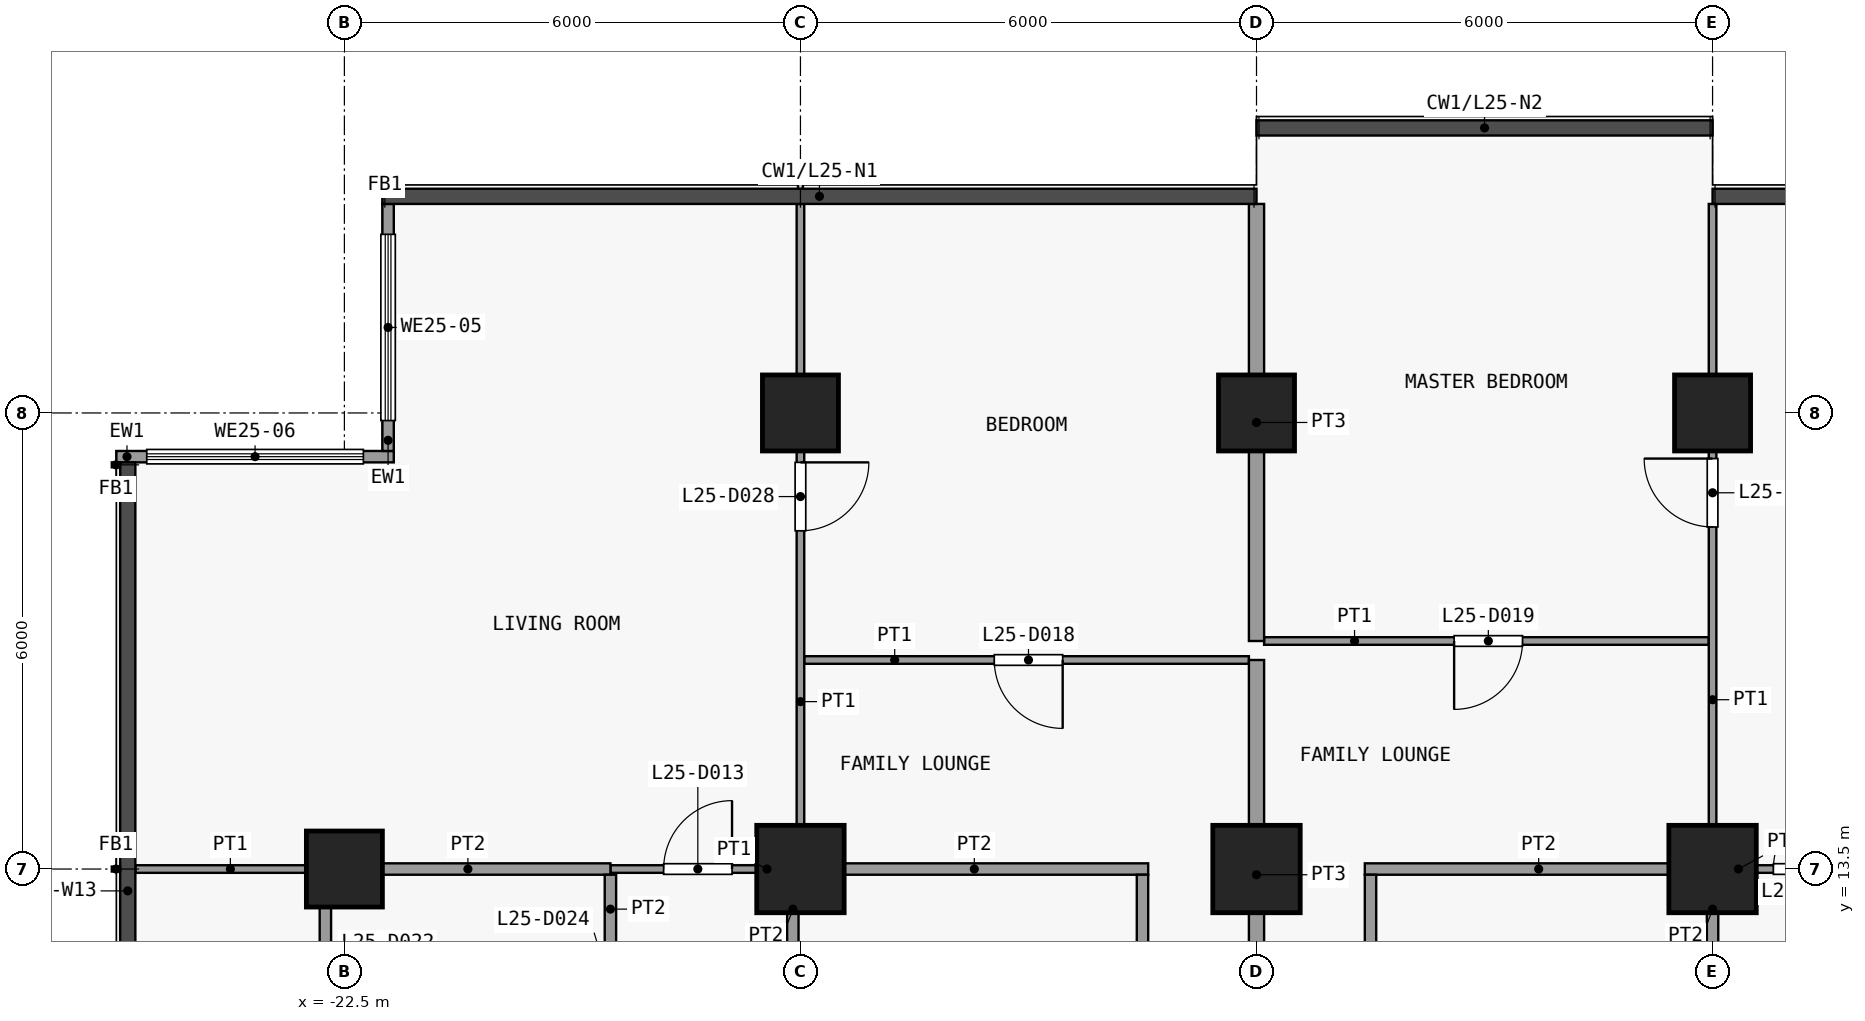
"""IFC4 building model, lengths in metres.
Left out: names, types, materials, properties, quantities, classifications, styles, units other than length and angle.
Written with IfcOpenShell. Run it as: python <this file> out.ifc"""

import sys

from ifc_helpers import new_model, si_unit, direction, frame, frame_2d, origin, origin_2d, place, context, subcontext, project, spatial, rectangle, extrude, element, fill, save


model = new_model("IFC4")
c1 = context("Model", 3, precision=1e-05, world=origin(), true_north=direction((0.0, 1.0)))
c2 = subcontext(c1, "Body", "Model", "MODEL_VIEW")
j1 = project(units=[si_unit("LENGTHUNIT", "METRE"), si_unit("PLANEANGLEUNIT", "RADIAN")], contexts=[c1])
p1 = place(None, origin())
s1 = spatial("IfcSite", under=j1, at=p1, CompositionType="ELEMENT")
p2 = place(p1, origin())
s2 = spatial("IfcBuilding", under=s1, at=p2, CompositionType="ELEMENT")
p3 = place(p2, frame((0.0, 0.0, 102.7)))
s3 = spatial("IfcBuildingStorey", under=s2, at=p3, CompositionType="ELEMENT", Elevation=102.7)
p4 = place(p3, frame((-22.5, 13.5, 0.0), z_axis=(0.0, 0.0, 1.0), x_axis=(1.0, 0.0, 0.0)))
e1 = element("IfcColumn", 1, at=p4, inside=s3, PredefinedType="COLUMN", context=c2, shape_type="SweptSolid", body=[
    extrude(rectangle(XDim=1.0, YDim=1.0, at=origin_2d()), origin(), (0.0, 0.0, 1.0), 3.6),
])
p5 = place(p3, frame((-16.5, 13.5, 0.0), z_axis=(0.0, 0.0, 1.0), x_axis=(1.0, 0.0, 0.0)))
e2 = element("IfcColumn", 2, at=p5, inside=s3, PredefinedType="COLUMN", context=c2, shape_type="SweptSolid", body=[
    extrude(rectangle(XDim=1.15, YDim=1.15, at=origin_2d()), origin(), (0.0, 0.0, 1.0), 3.6),
])
p6 = place(p3, frame((-16.5, 19.5, 0.0), z_axis=(0.0, 0.0, 1.0), x_axis=(1.0, 0.0, 0.0)))
e3 = element("IfcColumn", 3, at=p6, inside=s3, PredefinedType="COLUMN", context=c2, shape_type="SweptSolid", body=[
    extrude(rectangle(XDim=1.0, YDim=1.0, at=origin_2d()), origin(), (0.0, 0.0, 1.0), 3.6),
])
p7 = place(p3, frame((-10.5, 13.5, 0.0), z_axis=(0.0, 0.0, 1.0), x_axis=(1.0, 0.0, 0.0)))
e4 = element("IfcColumn", 4, at=p7, inside=s3, PredefinedType="COLUMN", context=c2, shape_type="SweptSolid", body=[
    extrude(rectangle(XDim=1.15, YDim=1.15, at=origin_2d()), origin(), (0.0, 0.0, 1.0), 3.6),
])
p8 = place(p3, frame((-10.5, 19.5, 0.0), z_axis=(0.0, 0.0, 1.0), x_axis=(1.0, 0.0, 0.0)))
e5 = element("IfcColumn", 5, at=p8, inside=s3, PredefinedType="COLUMN", context=c2, shape_type="SweptSolid", body=[
    extrude(rectangle(XDim=1.0, YDim=1.0, at=origin_2d()), origin(), (0.0, 0.0, 1.0), 3.6),
])
p9 = place(p3, frame((-4.5, 13.5, 0.0), z_axis=(0.0, 0.0, 1.0), x_axis=(1.0, 0.0, 0.0)))
e6 = element("IfcColumn", 6, at=p9, inside=s3, PredefinedType="COLUMN", context=c2, shape_type="SweptSolid", body=[
    extrude(rectangle(XDim=1.15, YDim=1.15, at=origin_2d()), origin(), (0.0, 0.0, 1.0), 3.6),
])
p10 = place(p3, frame((-4.5, 19.5, 0.0), z_axis=(0.0, 0.0, 1.0), x_axis=(1.0, 0.0, 0.0)))
e7 = element("IfcColumn", 7, at=p10, inside=s3, PredefinedType="COLUMN", context=c2, shape_type="SweptSolid", body=[
    extrude(rectangle(XDim=1.0, YDim=1.0, at=origin_2d()), origin(), (0.0, 0.0, 1.0), 3.6),
])
p11 = place(p3, frame((-21.925, 19.0, 0.0), z_axis=(0.0, 0.0, 1.0), x_axis=(0.0, 1.0, 0.0)))
e8 = element("IfcWall", 8, at=p11, inside=s3, PredefinedType="SOLIDWALL", context=c2, shape_type="SweptSolid", body=[
    extrude(rectangle(XDim=3.25, YDim=0.15, at=frame_2d((1.625, 0.0))), origin(), (0.0, 0.0, 1.0), 3.3),
])
p12 = place(p11, frame((0.4, 0.0, 0.9)))
e9 = element("IfcOpeningElement", 9, at=p12, cuts=e8, PredefinedType="OPENING", context=c2, shape_type="SweptSolid", body=[
    extrude(rectangle(XDim=2.45, YDim=2.4, at=frame_2d((1.225, 1.2))), frame((0.0, 0.085, 0.0), z_axis=(0.0, -1.0, 0.0), x_axis=(1.0, 0.0, 0.0)), (0.0, 0.0, 1.0), 0.17),
])
p13 = place(p3, frame((-25.5, 18.925, 0.0), z_axis=(0.0, 0.0, 1.0), x_axis=(1.0, 0.0, 0.0)))
e10 = element("IfcWall", 10, at=p13, inside=s3, PredefinedType="SOLIDWALL", context=c2, shape_type="SweptSolid", body=[
    extrude(rectangle(XDim=3.65, YDim=0.15, at=frame_2d((1.825, 0.0))), origin(), (0.0, 0.0, 1.0), 3.3),
])
p14 = place(p13, frame((0.4, 0.0, 0.9)))
e11 = element("IfcOpeningElement", 11, at=p14, cuts=e10, PredefinedType="OPENING", context=c2, shape_type="SweptSolid", body=[
    extrude(rectangle(XDim=2.85, YDim=2.4, at=frame_2d((1.425, 1.2))), frame((0.0, 0.085, 0.0), z_axis=(0.0, -1.0, 0.0), x_axis=(1.0, 0.0, 0.0)), (0.0, 0.0, 1.0), 0.17),
])
p15 = place(p3, frame((-25.25, 13.5, 0.0), z_axis=(0.0, 0.0, 1.0), x_axis=(1.0, 0.0, 0.0)))
e12 = element("IfcWall", 12, at=p15, inside=s3, PredefinedType="PARTITIONING", context=c2, shape_type="SweptSolid", body=[
    extrude(rectangle(XDim=2.5, YDim=0.1, at=frame_2d((1.25, 0.0))), origin(), (0.0, 0.0, 1.0), 3.3),
])
p16 = place(p3, frame((-19.0, 13.5, 0.0), z_axis=(0.0, 0.0, 1.0), x_axis=(1.0, 0.0, 0.0)))
e13 = element("IfcWall", 13, at=p16, inside=s3, PredefinedType="PARTITIONING", context=c2, shape_type="SweptSolid", body=[
    extrude(rectangle(XDim=2.4, YDim=0.1, at=frame_2d((1.2, 0.0))), origin(), (0.0, 0.0, 1.0), 3.3),
])
p17 = place(p16, frame((0.7, 0.0, 0.0)))
e14 = element("IfcOpeningElement", 14, at=p17, cuts=e13, PredefinedType="OPENING", context=c2, shape_type="SweptSolid", body=[
    extrude(rectangle(XDim=0.9, YDim=2.1, at=frame_2d((0.45, 1.05))), frame((0.0, 0.06, 0.0), z_axis=(0.0, -1.0, 0.0), x_axis=(1.0, 0.0, 0.0)), (0.0, 0.0, 1.0), 0.12),
])
p18 = place(p3, frame((-4.5, 13.5, 0.0), z_axis=(0.0, 0.0, 1.0), x_axis=(1.0, 0.0, 0.0)))
e15 = element("IfcWall", 15, at=p18, inside=s3, PredefinedType="PARTITIONING", context=c2, shape_type="SweptSolid", body=[
    extrude(rectangle(XDim=2.4, YDim=0.1, at=frame_2d((1.2, 0.0))), origin(), (0.0, 0.0, 1.0), 3.3),
])
p19 = place(p18, frame((0.8, 0.0, 0.0)))
e16 = element("IfcOpeningElement", 16, at=p19, cuts=e15, PredefinedType="OPENING", context=c2, shape_type="SweptSolid", body=[
    extrude(rectangle(XDim=0.9, YDim=2.1, at=frame_2d((0.45, 1.05))), frame((0.0, 0.06, 0.0), z_axis=(0.0, -1.0, 0.0), x_axis=(1.0, 0.0, 0.0)), (0.0, 0.0, 1.0), 0.12),
])
p20 = place(p3, frame((-22.75, 13.5, 0.0), z_axis=(0.0, 0.0, 1.0), x_axis=(1.0, 0.0, 0.0)))
e17 = element("IfcWall", 17, at=p20, inside=s3, PredefinedType="PARTITIONING", context=c2, shape_type="SweptSolid", body=[
    extrude(rectangle(XDim=3.75, YDim=0.15, at=frame_2d((1.875, 0.0))), origin(), (0.0, 0.0, 1.0), 3.3),
])
for number, where, z_axis, x_axis in (
    (18, (-16.5, 13.5, 0.0), (0.0, 0.0, 1.0), (1.0, 0.0, 0.0)),
    (19, (-9.075, 13.5, 0.0), (0.0, 0.0, 1.0), (1.0, 0.0, 0.0)),
):
    element("IfcWall", number, at=place(p3, frame(where, z_axis=z_axis, x_axis=x_axis)), inside=s3, PredefinedType="PARTITIONING", context=c2, shape_type="SweptSolid", body=[
        extrude(rectangle(XDim=4.575, YDim=0.15, at=frame_2d((2.288, 0.0))), origin(), (0.0, 0.0, 1.0), 3.3),
    ])
p21 = place(p3, frame((-16.45, 16.25, 0.0), z_axis=(0.0, 0.0, 1.0), x_axis=(1.0, 0.0, 0.0)))
e20 = element("IfcWall", 20, at=p21, inside=s3, PredefinedType="PARTITIONING", context=c2, shape_type="SweptSolid", body=[
    extrude(rectangle(XDim=5.85, YDim=0.1, at=frame_2d((2.925, 0.0))), origin(), (0.0, 0.0, 1.0), 3.3),
])
p22 = place(p21, frame((2.5, 0.0, 0.0)))
e21 = element("IfcOpeningElement", 21, at=p22, cuts=e20, PredefinedType="OPENING", context=c2, shape_type="SweptSolid", body=[
    extrude(rectangle(XDim=0.9, YDim=2.1, at=frame_2d((0.45, 1.05))), frame((0.0, 0.06, 0.0), z_axis=(0.0, -1.0, 0.0), x_axis=(1.0, 0.0, 0.0)), (0.0, 0.0, 1.0), 0.12),
])
p23 = place(p3, frame((-10.4, 16.5, 0.0), z_axis=(0.0, 0.0, 1.0), x_axis=(1.0, 0.0, 0.0)))
e22 = element("IfcWall", 22, at=p23, inside=s3, PredefinedType="PARTITIONING", context=c2, shape_type="SweptSolid", body=[
    extrude(rectangle(XDim=5.85, YDim=0.1, at=frame_2d((2.925, 0.0))), origin(), (0.0, 0.0, 1.0), 3.3),
])
p24 = place(p23, frame((2.5, 0.0, 0.0)))
e23 = element("IfcOpeningElement", 23, at=p24, cuts=e22, PredefinedType="OPENING", context=c2, shape_type="SweptSolid", body=[
    extrude(rectangle(XDim=0.9, YDim=2.1, at=frame_2d((0.45, 1.05))), frame((0.0, 0.06, 0.0), z_axis=(0.0, -1.0, 0.0), x_axis=(1.0, 0.0, 0.0)), (0.0, 0.0, 1.0), 0.12),
])
p25 = place(p3, frame((-22.75, 10.6, 0.0), z_axis=(0.0, 0.0, 1.0), x_axis=(0.0, 1.0, 0.0)))
e24 = element("IfcWall", 24, at=p25, inside=s3, PredefinedType="PARTITIONING", context=c2, shape_type="SweptSolid", body=[
    extrude(rectangle(XDim=2.825, YDim=0.15, at=frame_2d((1.413, 0.0))), origin(), (0.0, 0.0, 1.0), 3.3),
])
p26 = place(p25, frame((1.0, 0.0, 0.0)))
e25 = element("IfcOpeningElement", 25, at=p26, cuts=e24, PredefinedType="OPENING", context=c2, shape_type="SweptSolid", body=[
    extrude(rectangle(XDim=0.9, YDim=2.1, at=frame_2d((0.45, 1.05))), frame((0.0, 0.085, 0.0), z_axis=(0.0, -1.0, 0.0), x_axis=(1.0, 0.0, 0.0)), (0.0, 0.0, 1.0), 0.17),
])
p27 = place(p3, frame((-19.0, 10.6, 0.0), z_axis=(0.0, 0.0, 1.0), x_axis=(0.0, 1.0, 0.0)))
e26 = element("IfcWall", 26, at=p27, inside=s3, PredefinedType="PARTITIONING", context=c2, shape_type="SweptSolid", body=[
    extrude(rectangle(XDim=2.825, YDim=0.15, at=frame_2d((1.413, 0.0))), origin(), (0.0, 0.0, 1.0), 3.3),
])
p28 = place(p27, frame((0.9, 0.0, 0.0)))
e27 = element("IfcOpeningElement", 27, at=p28, cuts=e26, PredefinedType="OPENING", context=c2, shape_type="SweptSolid", body=[
    extrude(rectangle(XDim=0.9, YDim=2.1, at=frame_2d((0.45, 1.05))), frame((0.0, 0.085, 0.0), z_axis=(0.0, -1.0, 0.0), x_axis=(1.0, 0.0, 0.0)), (0.0, 0.0, 1.0), 0.17),
])
p29 = place(p3, frame((-16.6, 10.6, 0.0), z_axis=(0.0, 0.0, 1.0), x_axis=(0.0, 1.0, 0.0)))
e28 = element("IfcWall", 28, at=p29, inside=s3, PredefinedType="PARTITIONING", context=c2, shape_type="SweptSolid", body=[
    extrude(rectangle(XDim=2.825, YDim=0.15, at=frame_2d((1.413, 0.0))), origin(), (0.0, 0.0, 1.0), 3.3),
])
p30 = place(p29, frame((0.9, 0.0, 0.0)))
e29 = element("IfcOpeningElement", 29, at=p30, cuts=e28, PredefinedType="OPENING", context=c2, shape_type="SweptSolid", body=[
    extrude(rectangle(XDim=0.9, YDim=2.1, at=frame_2d((0.45, 1.05))), frame((0.0, 0.085, 0.0), z_axis=(0.0, -1.0, 0.0), x_axis=(1.0, 0.0, 0.0)), (0.0, 0.0, 1.0), 0.17),
])
p31 = place(p3, frame((-16.5, 13.575, 0.0), z_axis=(0.0, 0.0, 1.0), x_axis=(0.0, 1.0, 0.0)))
e30 = element("IfcWall", 30, at=p31, inside=s3, PredefinedType="PARTITIONING", context=c2, shape_type="SweptSolid", body=[
    extrude(rectangle(XDim=8.675, YDim=0.1, at=frame_2d((4.337, 0.0))), origin(), (0.0, 0.0, 1.0), 3.3),
])
p32 = place(p31, frame((4.375, 0.0, 0.0)))
e31 = element("IfcOpeningElement", 31, at=p32, cuts=e30, PredefinedType="OPENING", context=c2, shape_type="SweptSolid", body=[
    extrude(rectangle(XDim=0.9, YDim=2.1, at=frame_2d((0.45, 1.05))), frame((0.0, 0.06, 0.0), z_axis=(0.0, -1.0, 0.0), x_axis=(1.0, 0.0, 0.0)), (0.0, 0.0, 1.0), 0.12),
])
p33 = place(p3, frame((-12.0, 10.6, 0.0), z_axis=(0.0, 0.0, 1.0), x_axis=(0.0, 1.0, 0.0)))
e32 = element("IfcWall", 32, at=p33, inside=s3, PredefinedType="PARTITIONING", context=c2, shape_type="SweptSolid", body=[
    extrude(rectangle(XDim=2.825, YDim=0.15, at=frame_2d((1.413, 0.0))), origin(), (0.0, 0.0, 1.0), 3.3),
])
p34 = place(p3, frame((-10.5, 10.6, 0.0), z_axis=(0.0, 0.0, 1.0), x_axis=(0.0, 1.0, 0.0)))
e33 = element("IfcWall", 33, at=p34, inside=s3, PredefinedType="PARTITIONING", context=c2, shape_type="SweptSolid", body=[
    extrude(rectangle(XDim=5.65, YDim=0.2, at=frame_2d((2.825, 0.0))), origin(), (0.0, 0.0, 1.0), 3.3),
])
p35 = place(p3, frame((-10.5, 16.5, 0.0), z_axis=(0.0, 0.0, 1.0), x_axis=(0.0, 1.0, 0.0)))
e34 = element("IfcWall", 34, at=p35, inside=s3, PredefinedType="PARTITIONING", context=c2, shape_type="SweptSolid", body=[
    extrude(rectangle(XDim=5.75, YDim=0.2, at=frame_2d((2.875, 0.0))), origin(), (0.0, 0.0, 1.0), 3.3),
])
p36 = place(p3, frame((-9.0, 10.6, 0.0), z_axis=(0.0, 0.0, 1.0), x_axis=(0.0, 1.0, 0.0)))
e35 = element("IfcWall", 35, at=p36, inside=s3, PredefinedType="PARTITIONING", context=c2, shape_type="SweptSolid", body=[
    extrude(rectangle(XDim=2.825, YDim=0.15, at=frame_2d((1.413, 0.0))), origin(), (0.0, 0.0, 1.0), 3.3),
])
p37 = place(p3, frame((-4.5, 13.575, 0.0), z_axis=(0.0, 0.0, 1.0), x_axis=(0.0, 1.0, 0.0)))
e36 = element("IfcWall", 36, at=p37, inside=s3, PredefinedType="PARTITIONING", context=c2, shape_type="SweptSolid", body=[
    extrude(rectangle(XDim=8.675, YDim=0.1, at=frame_2d((4.337, 0.0))), origin(), (0.0, 0.0, 1.0), 3.3),
])
p38 = place(p37, frame((4.425, 0.0, 0.0)))
e37 = element("IfcOpeningElement", 37, at=p38, cuts=e36, PredefinedType="OPENING", context=c2, shape_type="SweptSolid", body=[
    extrude(rectangle(XDim=0.9, YDim=2.1, at=frame_2d((0.45, 1.05))), frame((0.0, 0.06, 0.0), z_axis=(0.0, -1.0, 0.0), x_axis=(1.0, 0.0, 0.0)), (0.0, 0.0, 1.0), 0.12),
])
p39 = place(p3, frame((-4.5, 10.6, 0.0), z_axis=(0.0, 0.0, 1.0), x_axis=(0.0, 1.0, 0.0)))
e38 = element("IfcWall", 38, at=p39, inside=s3, PredefinedType="PARTITIONING", context=c2, shape_type="SweptSolid", body=[
    extrude(rectangle(XDim=2.825, YDim=0.15, at=frame_2d((1.413, 0.0))), origin(), (0.0, 0.0, 1.0), 3.3),
])
p40 = place(p39, frame((0.9, 0.0, 0.0)))
e39 = element("IfcOpeningElement", 39, at=p40, cuts=e38, PredefinedType="OPENING", context=c2, shape_type="SweptSolid", body=[
    extrude(rectangle(XDim=0.9, YDim=2.1, at=frame_2d((0.45, 1.05))), frame((0.0, 0.085, 0.0), z_axis=(0.0, -1.0, 0.0), x_axis=(1.0, 0.0, 0.0)), (0.0, 0.0, 1.0), 0.17),
])
p41 = place(p12, origin())
e40 = element("IfcWindow", 40, at=p41, inside=s3, PartitioningType="SINGLE_PANEL", PredefinedType="WINDOW", context=c2, shape_type="SweptSolid", body=[
    extrude(rectangle(XDim=2.45, YDim=2.4, at=frame_2d((1.225, 1.2))), frame((0.0, 0.03, 0.0), z_axis=(0.0, -1.0, 0.0), x_axis=(1.0, 0.0, 0.0)), (0.0, 0.0, 1.0), 0.06),
])
fill(e9, e40)
p42 = place(p14, origin())
e41 = element("IfcWindow", 41, at=p42, inside=s3, PartitioningType="SINGLE_PANEL", PredefinedType="WINDOW", context=c2, shape_type="SweptSolid", body=[
    extrude(rectangle(XDim=2.85, YDim=2.4, at=frame_2d((1.425, 1.2))), frame((0.0, 0.03, 0.0), z_axis=(0.0, -1.0, 0.0), x_axis=(1.0, 0.0, 0.0)), (0.0, 0.0, 1.0), 0.06),
])
fill(e11, e41)
p43 = place(p17, origin())
e42 = element("IfcDoor", 42, at=p43, inside=s3, OperationType="SINGLE_SWING_LEFT", PredefinedType="DOOR", context=c2, shape_type="SweptSolid", body=[
    extrude(rectangle(XDim=0.9, YDim=2.1, at=frame_2d((0.45, 1.05))), frame((0.0, 0.025, 0.0), z_axis=(0.0, -1.0, 0.0), x_axis=(1.0, 0.0, 0.0)), (0.0, 0.0, 1.0), 0.05),
])
fill(e14, e42)
p44 = place(p19, origin())
e43 = element("IfcDoor", 43, at=p44, inside=s3, OperationType="SINGLE_SWING_LEFT", PredefinedType="DOOR", context=c2, shape_type="SweptSolid", body=[
    extrude(rectangle(XDim=0.9, YDim=2.1, at=frame_2d((0.45, 1.05))), frame((0.0, 0.025, 0.0), z_axis=(0.0, -1.0, 0.0), x_axis=(1.0, 0.0, 0.0)), (0.0, 0.0, 1.0), 0.05),
])
fill(e16, e43)
p45 = place(p22, origin())
e44 = element("IfcDoor", 44, at=p45, inside=s3, OperationType="SINGLE_SWING_RIGHT", PredefinedType="DOOR", context=c2, shape_type="SweptSolid", body=[
    extrude(rectangle(XDim=0.9, YDim=2.1, at=frame_2d((0.45, 1.05))), frame((0.0, 0.025, 0.0), z_axis=(0.0, -1.0, 0.0), x_axis=(1.0, 0.0, 0.0)), (0.0, 0.0, 1.0), 0.05),
])
fill(e21, e44)
p46 = place(p24, origin())
e45 = element("IfcDoor", 45, at=p46, inside=s3, OperationType="SINGLE_SWING_LEFT", PredefinedType="DOOR", context=c2, shape_type="SweptSolid", body=[
    extrude(rectangle(XDim=0.9, YDim=2.1, at=frame_2d((0.45, 1.05))), frame((0.0, 0.025, 0.0), z_axis=(0.0, -1.0, 0.0), x_axis=(1.0, 0.0, 0.0)), (0.0, 0.0, 1.0), 0.05),
])
fill(e23, e45)
p47 = place(p32, origin())
e46 = element("IfcDoor", 46, at=p47, inside=s3, OperationType="SINGLE_SWING_RIGHT", PredefinedType="DOOR", context=c2, shape_type="SweptSolid", body=[
    extrude(rectangle(XDim=0.9, YDim=2.1, at=frame_2d((0.45, 1.05))), frame((0.0, 0.025, 0.0), z_axis=(0.0, -1.0, 0.0), x_axis=(1.0, 0.0, 0.0)), (0.0, 0.0, 1.0), 0.05),
])
fill(e31, e46)
p48 = place(p38, origin())
e47 = element("IfcDoor", 47, at=p48, inside=s3, OperationType="SINGLE_SWING_LEFT", PredefinedType="DOOR", context=c2, shape_type="SweptSolid", body=[
    extrude(rectangle(XDim=0.9, YDim=2.1, at=frame_2d((0.45, 1.05))), frame((0.0, 0.025, 0.0), z_axis=(0.0, -1.0, 0.0), x_axis=(1.0, 0.0, 0.0)), (0.0, 0.0, 1.0), 0.05),
])
fill(e37, e47)
save(model, sys.argv[1])
